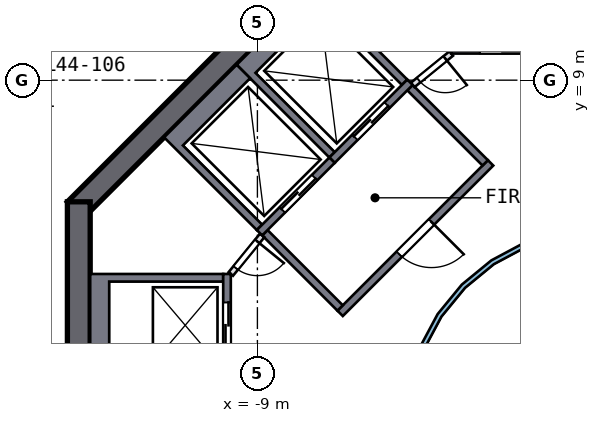
"""IFC4 building model, lengths in metres.
Left out: names, types, materials, properties, quantities, classifications, styles, units other than length and angle.
Written with IfcOpenShell. Run it as: python <this file> out.ifc"""

import sys

from ifc_helpers import new_model, si_unit, direction, frame, frame_2d, origin, place, context, subcontext, project, spatial, polyline, rectangle, outline, extrude, element, fill, save


model = new_model("IFC4")
c1 = context("Model", 3, precision=1e-05, world=origin(), true_north=direction((0.0, 1.0)))
c2 = subcontext(c1, "Body", "Model", "MODEL_VIEW")
j1 = project(units=[si_unit("LENGTHUNIT", "METRE"), si_unit("PLANEANGLEUNIT", "RADIAN")], contexts=[c1])
p1 = place(None, origin())
s1 = spatial("IfcSite", under=j1, at=p1, CompositionType="ELEMENT")
p2 = place(p1, origin())
s2 = spatial("IfcBuilding", under=s1, at=p2, CompositionType="ELEMENT")
p3 = place(p2, frame((0.0, 0.0, 183.5)))
s3 = spatial("IfcBuildingStorey", under=s2, at=p3, CompositionType="ELEMENT", Elevation=183.5)
p4 = place(p3, frame((-5.587, 13.788, 0.0), z_axis=(0.0, 0.0, 1.0), x_axis=(-0.707106781, -0.707106781, 0.0)))
e1 = element("IfcWall", 1, at=p4, inside=s3, PredefinedType="SHEAR", context=c2, shape_type="SweptSolid", body=[
    extrude(rectangle(XDim=11.598, YDim=0.6, at=frame_2d((5.799, 0.0))), origin(), (0.0, 0.0, 1.0), 3.5),
])
p5 = place(p3, frame((-13.7, 5.799, 0.0), z_axis=(0.0, 0.0, 1.0), x_axis=(0.0, -1.0, 0.0)))
e2 = element("IfcWall", 2, at=p5, inside=s3, PredefinedType="SHEAR", context=c2, shape_type="SweptSolid", body=[
    extrude(rectangle(XDim=11.598, YDim=0.6, at=frame_2d((5.799, 0.0))), origin(), (0.0, 0.0, 1.0), 3.5),
])
p6 = place(p5, frame((4.899, 0.0, 0.0)))
e3 = element("IfcOpeningElement", 3, at=p6, cuts=e2, PredefinedType="OPENING", context=c2, shape_type="SweptSolid", body=[
    extrude(rectangle(XDim=1.8, YDim=2.1, at=frame_2d((0.9, 1.05))), frame((0.0, 0.31, 0.0), z_axis=(0.0, -1.0, 0.0), x_axis=(1.0, 0.0, 0.0)), (0.0, 0.0, 1.0), 0.62),
])
p7 = place(p3, frame((-1.2, 9.8, 0.0), z_axis=(0.0, 0.0, 1.0), x_axis=(-1.0, 0.0, 0.0)))
e4 = element("IfcWall", 4, at=p7, inside=s3, PredefinedType="SOLIDWALL", context=c2, shape_type="SweptSolid", body=[
    extrude(rectangle(XDim=2.7, YDim=0.2, at=frame_2d((1.35, 0.0))), origin(), (0.0, 0.0, 1.0), 3.19),
])
p8 = place(p7, frame((0.75, 0.0, 0.0)))
e5 = element("IfcOpeningElement", 5, at=p8, cuts=e4, PredefinedType="OPENING", context=c2, shape_type="SweptSolid", body=[
    extrude(rectangle(XDim=1.2, YDim=2.1, at=frame_2d((0.6, 1.05))), frame((0.0, 0.11, 0.0), z_axis=(0.0, -1.0, 0.0), x_axis=(1.0, 0.0, 0.0)), (0.0, 0.0, 1.0), 0.22),
])
p9 = place(p3, origin())
e6 = element("IfcWall", 6, at=p9, inside=s3, PredefinedType="SOLIDWALL", context=c2, shape_type="SweptSolid", body=[
    extrude(outline(polyline([(-13.4, 3.9), (-9.9, 3.9), (-9.9, 3.7), (-12.9, 3.7), (-12.9, 1.4), (-9.9, 1.4), (-9.9, 1.2), (-13.4, 1.2), (-13.4, 3.9)])), origin(), (0.0, 0.0, 1.0), 3.19),
])
p10 = place(p3, frame((-9.8, 1.2, 0.0), z_axis=(0.0, 0.0, 1.0), x_axis=(0.0, 1.0, 0.0)))
e7 = element("IfcWall", 7, at=p10, inside=s3, PredefinedType="SOLIDWALL", context=c2, shape_type="SweptSolid", body=[
    extrude(rectangle(XDim=2.7, YDim=0.2, at=frame_2d((1.35, 0.0))), origin(), (0.0, 0.0, 1.0), 3.19),
])
p11 = place(p10, frame((0.75, 0.0, 0.0)))
e8 = element("IfcOpeningElement", 8, at=p11, cuts=e7, PredefinedType="OPENING", context=c2, shape_type="SweptSolid", body=[
    extrude(rectangle(XDim=1.2, YDim=2.1, at=frame_2d((0.6, 1.05))), frame((0.0, 0.11, 0.0), z_axis=(0.0, -1.0, 0.0), x_axis=(1.0, 0.0, 0.0)), (0.0, 0.0, 1.0), 0.22),
])
p12 = place(p3, origin())
e9 = element("IfcWall", 9, at=p12, inside=s3, PredefinedType="SOLIDWALL", context=c2, shape_type="SweptSolid", body=[
    extrude(outline(polyline([(-9.546, 9.405), (-7.495, 11.455), (-5.056, 9.016), (-5.197, 8.874), (-7.283, 10.96), (-9.051, 9.192), (-6.965, 7.106), (-7.106, 6.965), (-9.546, 9.405)])), origin(), (0.0, 0.0, 1.0), 3.19),
])
p13 = place(p3, frame((-4.985, 8.945, 0.0), z_axis=(0.0, 0.0, 1.0), x_axis=(-0.707106781, -0.707106781, 0.0)))
e10 = element("IfcWall", 10, at=p13, inside=s3, PredefinedType="SOLIDWALL", context=c2, shape_type="SweptSolid", body=[
    extrude(rectangle(XDim=2.9, YDim=0.2, at=frame_2d((1.45, 0.0))), origin(), (0.0, 0.0, 1.0), 3.19),
])
p14 = place(p13, frame((0.85, 0.0, 0.0)))
e11 = element("IfcOpeningElement", 11, at=p14, cuts=e10, PredefinedType="OPENING", context=c2, shape_type="SweptSolid", body=[
    extrude(rectangle(XDim=1.2, YDim=2.1, at=frame_2d((0.6, 1.05))), frame((0.0, 0.11, 0.0), z_axis=(0.0, -1.0, 0.0), x_axis=(1.0, 0.0, 0.0)), (0.0, 0.0, 1.0), 0.22),
])
p15 = place(p3, origin())
e12 = element("IfcWall", 12, at=p15, inside=s3, PredefinedType="SOLIDWALL", context=c2, shape_type="SweptSolid", body=[
    extrude(outline(polyline([(-11.455, 7.495), (-9.546, 9.405), (-9.192, 9.051), (-10.96, 7.283), (-8.874, 5.197), (-9.016, 5.056), (-11.455, 7.495)])), origin(), (0.0, 0.0, 1.0), 3.19),
])
p16 = place(p3, frame((-7.036, 6.894, 0.0), z_axis=(0.0, 0.0, 1.0), x_axis=(-0.707106781, -0.707106781, 0.0)))
e13 = element("IfcWall", 13, at=p16, inside=s3, PredefinedType="SOLIDWALL", context=c2, shape_type="SweptSolid", body=[
    extrude(rectangle(XDim=2.7, YDim=0.2, at=frame_2d((1.35, 0.0))), origin(), (0.0, 0.0, 1.0), 3.19),
])
p17 = place(p16, frame((0.65, 0.0, 0.0)))
e14 = element("IfcOpeningElement", 14, at=p17, cuts=e13, PredefinedType="OPENING", context=c2, shape_type="SweptSolid", body=[
    extrude(rectangle(XDim=1.2, YDim=2.1, at=frame_2d((0.6, 1.05))), frame((0.0, 0.11, 0.0), z_axis=(0.0, -1.0, 0.0), x_axis=(1.0, 0.0, 0.0)), (0.0, 0.0, 1.0), 0.22),
])
p18 = place(p3, frame((-2.864, 6.823, 0.0), z_axis=(0.0, 0.0, 1.0), x_axis=(-0.707106781, -0.707106781, 0.0)))
e15 = element("IfcWall", 15, at=p18, inside=s3, PredefinedType="SOLIDWALL", context=c2, shape_type="SweptSolid", body=[
    extrude(rectangle(XDim=5.6, YDim=0.2, at=frame_2d((2.8, 0.0))), origin(), (0.0, 0.0, 1.0), 3.19),
])
p19 = place(p18, frame((2.2, 0.0, 0.0)))
e16 = element("IfcOpeningElement", 16, at=p19, cuts=e15, PredefinedType="OPENING", context=c2, shape_type="SweptSolid", body=[
    extrude(rectangle(XDim=1.2, YDim=2.1, at=frame_2d((0.6, 1.05))), frame((0.0, 0.11, 0.0), z_axis=(0.0, -1.0, 0.0), x_axis=(1.0, 0.0, 0.0)), (0.0, 0.0, 1.0), 0.22),
])
for number, where, z_axis, x_axis in (
    (17, (-3.005, 6.823, 0.0), (0.0, 0.0, 1.0), (-0.707, 0.707, 0.0)),
    (18, (-6.823, 3.005, 0.0), (0.0, 0.0, 1.0), (-0.707, 0.707, 0.0)),
):
    element("IfcWall", number, at=place(p3, frame(where, z_axis=z_axis, x_axis=x_axis)), inside=s3, PredefinedType="SOLIDWALL", context=c2, shape_type="SweptSolid", body=[
        extrude(rectangle(XDim=2.8, YDim=0.2, at=frame_2d((1.4, 0.0))), origin(), (0.0, 0.0, 1.0), 3.19),
    ])
p20 = place(p3, frame((-3.9, 9.7, 0.0), z_axis=(0.0, 0.0, 1.0), x_axis=(-0.775559878, -0.631274009, 0.0)))
e19 = element("IfcWall", 19, at=p20, inside=s3, PredefinedType="PARTITIONING", context=c2, shape_type="SweptSolid", body=[
    extrude(rectangle(XDim=1.308, YDim=0.15, at=frame_2d((0.654, 0.0))), origin(), (0.0, 0.0, 1.0), 3.19),
])
p21 = place(p20, frame((0.204, 0.0, 0.0)))
e20 = element("IfcOpeningElement", 20, at=p21, cuts=e19, PredefinedType="OPENING", context=c2, shape_type="SweptSolid", body=[
    extrude(rectangle(XDim=0.9, YDim=2.1, at=frame_2d((0.45, 1.05))), frame((0.0, 0.085, 0.0), z_axis=(0.0, -1.0, 0.0), x_axis=(1.0, 0.0, 0.0)), (0.0, 0.0, 1.0), 0.17),
])
p22 = place(p3, frame((-8.874, 4.914, 0.0), z_axis=(0.0, 0.0, 1.0), x_axis=(-0.631274009, -0.775559878, 0.0)))
e21 = element("IfcWall", 21, at=p22, inside=s3, PredefinedType="PARTITIONING", context=c2, shape_type="SweptSolid", body=[
    extrude(rectangle(XDim=1.308, YDim=0.15, at=frame_2d((0.654, 0.0))), origin(), (0.0, 0.0, 1.0), 3.19),
])
p23 = place(p22, frame((0.204, 0.0, 0.0)))
e22 = element("IfcOpeningElement", 22, at=p23, cuts=e21, PredefinedType="OPENING", context=c2, shape_type="SweptSolid", body=[
    extrude(rectangle(XDim=0.9, YDim=2.1, at=frame_2d((0.45, 1.05))), frame((0.0, 0.085, 0.0), z_axis=(0.0, -1.0, 0.0), x_axis=(1.0, 0.0, 0.0)), (0.0, 0.0, 1.0), 0.17),
])
p24 = place(p3, origin())
e23 = element("IfcWall", 23, at=p24, inside=s3, PredefinedType="SOLIDWALL", context=c2, shape_type="SweptSolid", body=[
    extrude(outline(polyline([(5.021, -0.999), (4.73, -1.959), (4.257, -2.844), (3.62, -3.62), (2.844, -4.257), (1.959, -4.73), (0.999, -5.021), (0.0, -5.12), (-0.999, -5.021), (-1.959, -4.73), (-2.844, -4.257), (-3.62, -3.62), (-4.257, -2.844), (-4.73, -1.959), (-5.021, -0.999), (-5.12, 0.0), (-5.021, 0.999), (-4.73, 1.959), (-4.257, 2.844), (-3.62, 3.62), (-2.844, 4.257), (-1.959, 4.73), (-0.999, 5.021), (0.0, 5.12), (0.999, 5.021), (1.959, 4.73), (2.844, 4.257), (3.62, 3.62), (4.257, 2.844), (4.73, 1.959), (5.021, 0.999), (5.12, 0.0), (5.021, -0.999)]), holes=[polyline([(4.904, 0.976), (4.619, 1.913), (4.157, 2.778), (3.535, 3.535), (2.778, 4.157), (1.913, 4.619), (0.976, 4.904), (0.0, 5.0), (-0.976, 4.904), (-1.913, 4.619), (-2.778, 4.157), (-3.535, 3.535), (-4.157, 2.778), (-4.619, 1.913), (-4.904, 0.976), (-5.0, 0.0), (-4.904, -0.976), (-4.619, -1.913), (-4.157, -2.778), (-3.535, -3.535), (-2.778, -4.157), (-1.913, -4.619), (-0.976, -4.904), (0.0, -5.0), (0.976, -4.904), (1.913, -4.619), (2.778, -4.157), (3.535, -3.535), (4.157, -2.778), (4.619, -1.913), (4.904, -0.976), (5.0, 0.0), (4.904, 0.976)])]), origin(), (0.0, 0.0, 1.0), 3.19),
])
p25 = place(p3, frame((-18.182, 2.724, 0.0), z_axis=(0.0, 0.0, 1.0), x_axis=(0.399077747, 0.916917091, 0.0)))
e24 = element("IfcWall", 24, at=p25, inside=s3, PredefinedType="SOLIDWALL", context=c2, shape_type="SweptSolid", body=[
    extrude(rectangle(XDim=9.316, YDim=0.2, at=frame_2d((4.658, 0.0))), origin(), (0.0, 0.0, 1.0), 3.19),
])
p26 = place(p25, frame((1.9, 0.0, 0.0)))
e25 = element("IfcOpeningElement", 25, at=p26, cuts=e24, PredefinedType="OPENING", context=c2, shape_type="SweptSolid", body=[
    extrude(rectangle(XDim=1.0, YDim=2.1, at=frame_2d((0.5, 1.05))), frame((0.0, 0.11, 0.0), z_axis=(0.0, -1.0, 0.0), x_axis=(1.0, 0.0, 0.0)), (0.0, 0.0, 1.0), 0.22),
])
p27 = place(p11, origin())
e26 = element("IfcDoor", 26, at=p27, inside=s3, OperationType="DOUBLE_DOOR_SLIDING", PredefinedType="DOOR", context=c2, shape_type="SweptSolid", body=[
    extrude(rectangle(XDim=1.2, YDim=2.1, at=frame_2d((0.6, 1.05))), frame((0.0, 0.025, 0.0), z_axis=(0.0, -1.0, 0.0), x_axis=(1.0, 0.0, 0.0)), (0.0, 0.0, 1.0), 0.05),
])
fill(e8, e26)
p28 = place(p14, origin())
e27 = element("IfcDoor", 27, at=p28, inside=s3, OperationType="DOUBLE_DOOR_SLIDING", PredefinedType="DOOR", context=c2, shape_type="SweptSolid", body=[
    extrude(rectangle(XDim=1.2, YDim=2.1, at=frame_2d((0.6, 1.05))), frame((0.0, 0.025, 0.0), z_axis=(0.0, -1.0, 0.0), x_axis=(1.0, 0.0, 0.0)), (0.0, 0.0, 1.0), 0.05),
])
fill(e11, e27)
p29 = place(p17, origin())
e28 = element("IfcDoor", 28, at=p29, inside=s3, OperationType="DOUBLE_DOOR_SLIDING", PredefinedType="DOOR", context=c2, shape_type="SweptSolid", body=[
    extrude(rectangle(XDim=1.2, YDim=2.1, at=frame_2d((0.6, 1.05))), frame((0.0, 0.025, 0.0), z_axis=(0.0, -1.0, 0.0), x_axis=(1.0, 0.0, 0.0)), (0.0, 0.0, 1.0), 0.05),
])
fill(e14, e28)
p30 = place(p19, origin())
e29 = element("IfcDoor", 29, at=p30, inside=s3, OperationType="SINGLE_SWING_LEFT", PredefinedType="DOOR", context=c2, shape_type="SweptSolid", body=[
    extrude(rectangle(XDim=1.2, YDim=2.1, at=frame_2d((0.6, 1.05))), frame((0.0, 0.025, 0.0), z_axis=(0.0, -1.0, 0.0), x_axis=(1.0, 0.0, 0.0)), (0.0, 0.0, 1.0), 0.05),
])
fill(e16, e29)
p31 = place(p21, origin())
e30 = element("IfcDoor", 30, at=p31, inside=s3, OperationType="SINGLE_SWING_LEFT", PredefinedType="DOOR", context=c2, shape_type="SweptSolid", body=[
    extrude(rectangle(XDim=0.9, YDim=2.1, at=frame_2d((0.45, 1.05))), frame((0.0, 0.025, 0.0), z_axis=(0.0, -1.0, 0.0), x_axis=(1.0, 0.0, 0.0)), (0.0, 0.0, 1.0), 0.05),
])
fill(e20, e30)
p32 = place(p23, origin())
e31 = element("IfcDoor", 31, at=p32, inside=s3, OperationType="SINGLE_SWING_LEFT", PredefinedType="DOOR", context=c2, shape_type="SweptSolid", body=[
    extrude(rectangle(XDim=0.9, YDim=2.1, at=frame_2d((0.45, 1.05))), frame((0.0, 0.025, 0.0), z_axis=(0.0, -1.0, 0.0), x_axis=(1.0, 0.0, 0.0)), (0.0, 0.0, 1.0), 0.05),
])
fill(e22, e31)
save(model, sys.argv[1])
